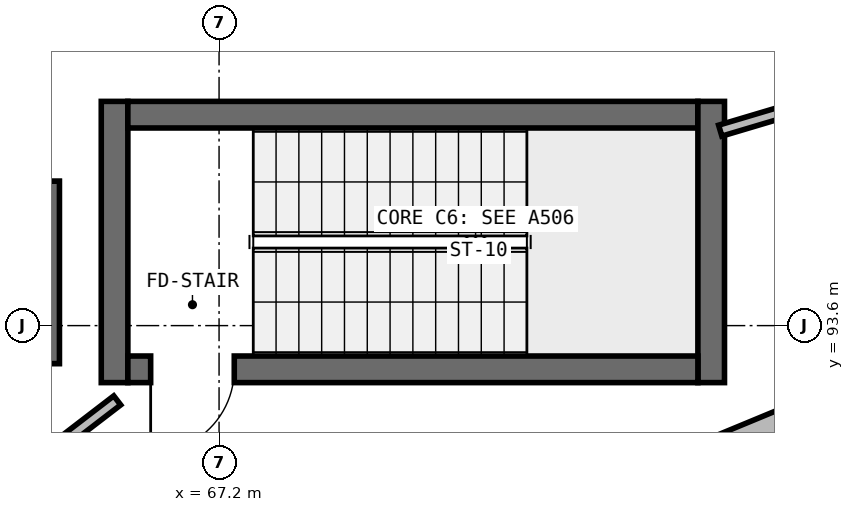
"""IFC4 building model, lengths in metres.
Left out: names, types, materials, properties, quantities, classifications, styles, units other than length and angle.
Written with IfcOpenShell. Run it as: python <this file> out.ifc"""

import sys

from ifc_helpers import new_model, si_unit, direction, frame, frame_2d, origin, place, context, subcontext, project, spatial, rectangle, extrude, element, fill, save


model = new_model("IFC4")
c1 = context("Model", 3, precision=1e-05, world=origin(), true_north=direction((0.0, 1.0)))
c2 = subcontext(c1, "Body", "Model", "MODEL_VIEW")
j1 = project(units=[si_unit("LENGTHUNIT", "METRE"), si_unit("PLANEANGLEUNIT", "RADIAN")], contexts=[c1])
p1 = place(None, origin())
s1 = spatial("IfcSite", under=j1, at=p1, CompositionType="ELEMENT")
p2 = place(p1, origin())
s2 = spatial("IfcBuilding", under=s1, at=p2, CompositionType="ELEMENT")
p3 = place(p2, frame((0.0, 0.0, 18.9)))
s3 = spatial("IfcBuildingStorey", under=s2, at=p3, CompositionType="ELEMENT", Elevation=18.9)
p4 = place(p3, frame((65.825, 92.85, 0.0), z_axis=(0.0, 0.0, 1.0), x_axis=(0.0, 1.0, 0.0)))
e1 = element("IfcWall", 1, at=p4, inside=s3, PredefinedType="SHEAR", context=c2, shape_type="SweptSolid", body=[
    extrude(rectangle(XDim=3.7, YDim=0.35, at=frame_2d((1.85, 0.0))), origin(), (0.0, 0.0, 1.0), 4.55),
])
p5 = place(p3, frame((66.0, 96.375, 0.0), z_axis=(0.0, 0.0, 1.0), x_axis=(1.0, 0.0, 0.0)))
e2 = element("IfcWall", 2, at=p5, inside=s3, PredefinedType="SHEAR", context=c2, shape_type="SweptSolid", body=[
    extrude(rectangle(XDim=7.5, YDim=0.35, at=frame_2d((3.75, 0.0))), origin(), (0.0, 0.0, 1.0), 4.55),
])
p6 = place(p3, frame((73.675, 96.55, 0.0), z_axis=(0.0, 0.0, 1.0), x_axis=(0.0, -1.0, 0.0)))
e3 = element("IfcWall", 3, at=p6, inside=s3, PredefinedType="SHEAR", context=c2, shape_type="SweptSolid", body=[
    extrude(rectangle(XDim=3.7, YDim=0.35, at=frame_2d((1.85, 0.0))), origin(), (0.0, 0.0, 1.0), 4.55),
])
p7 = place(p3, frame((73.5, 93.025, 0.0), z_axis=(0.0, 0.0, 1.0), x_axis=(-1.0, 0.0, 0.0)))
e4 = element("IfcWall", 4, at=p7, inside=s3, PredefinedType="SHEAR", context=c2, shape_type="SweptSolid", body=[
    extrude(rectangle(XDim=7.5, YDim=0.35, at=frame_2d((3.75, 0.0))), origin(), (0.0, 0.0, 1.0), 4.55),
])
p8 = place(p7, frame((6.1, 0.0, 0.0)))
e5 = element("IfcOpeningElement", 5, at=p8, cuts=e4, PredefinedType="OPENING", context=c2, shape_type="SweptSolid", body=[
    extrude(rectangle(XDim=1.1, YDim=2.15, at=frame_2d((0.55, 1.075))), frame((0.0, 0.185, 0.0), z_axis=(0.0, -1.0, 0.0), x_axis=(1.0, 0.0, 0.0)), (0.0, 0.0, 1.0), 0.37),
])
p9 = place(p3, frame((64.95, 95.5, 0.0), z_axis=(0.0, 0.0, 1.0), x_axis=(0.0, -1.0, 0.0)))
e6 = element("IfcWall", 6, at=p9, inside=s3, PredefinedType="SHEAR", context=c2, shape_type="SweptSolid", body=[
    extrude(rectangle(XDim=2.4, YDim=0.3, at=frame_2d((1.2, 0.0))), origin(), (0.0, 0.0, 1.0), 4.37),
])
p10 = place(p3, frame((76.988, 93.341, 0.0), z_axis=(0.0, 0.0, 1.0), x_axis=(-0.92385889973, -0.382733240508, 0.0)))
e7 = element("IfcWall", 7, at=p10, inside=s3, PredefinedType="SOLIDWALL", context=c2, shape_type="SweptSolid", body=[
    extrude(rectangle(XDim=10.081, YDim=0.29, at=frame_2d((5.04, 0.0))), origin(), (0.0, 0.0, 1.0), 4.31),
])
p11 = place(p10, frame((4.02, 0.0, 0.95)))
e8 = element("IfcOpeningElement", 8, at=p11, cuts=e7, PredefinedType="OPENING", context=c2, shape_type="SweptSolid", body=[
    extrude(rectangle(XDim=2.04, YDim=1.51, at=frame_2d((1.02, 0.755))), frame((0.0, 0.155, 0.0), z_axis=(0.0, -1.0, 0.0), x_axis=(1.0, 0.0, 0.0)), (0.0, 0.0, 1.0), 0.31),
])
p12 = place(p3, frame((76.057, 96.839, 0.0), z_axis=(0.0, 0.0, 1.0), x_axis=(-0.95838508169, -0.285478607244, 0.0)))
e9 = element("IfcWall", 9, at=p12, inside=s3, PredefinedType="PARTITIONING", context=c2, shape_type="SweptSolid", body=[
    extrude(rectangle(XDim=2.361, YDim=0.15, at=frame_2d((1.181, 0.0))), origin(), (0.0, 0.0, 1.0), 3.676),
])
p13 = place(p3, frame((65.86, 92.616, 0.0), z_axis=(0.0, 0.0, 1.0), x_axis=(-0.793301872689, -0.608828497024, 0.0)))
e10 = element("IfcWall", 10, at=p13, inside=s3, PredefinedType="PARTITIONING", context=c2, shape_type="SweptSolid", body=[
    extrude(rectangle(XDim=11.038, YDim=0.15, at=frame_2d((5.519, 0.0))), origin(), (0.0, 0.0, 1.0), 3.676),
])
p14 = place(p13, frame((4.95, 0.0, 0.0)))
e11 = element("IfcOpeningElement", 11, at=p14, cuts=e10, PredefinedType="OPENING", context=c2, shape_type="SweptSolid", body=[
    extrude(rectangle(XDim=1.1, YDim=2.2, at=frame_2d((0.55, 1.1))), frame((0.0, 0.085, 0.0), z_axis=(0.0, -1.0, 0.0), x_axis=(1.0, 0.0, 0.0)), (0.0, 0.0, 1.0), 0.17),
])
p15 = place(p3, frame((76.057, 96.839, 0.0), z_axis=(0.0, 0.0, 1.0), x_axis=(-0.258832719409, 0.965922162166, 0.0)))
e12 = element("IfcWall", 12, at=p15, inside=s3, PredefinedType="PARTITIONING", context=c2, shape_type="SweptSolid", body=[
    extrude(rectangle(XDim=6.44, YDim=0.15, at=frame_2d((3.22, 0.0))), origin(), (0.0, 0.0, 1.0), 3.676),
])
p16 = place(p8, origin())
e13 = element("IfcDoor", 13, at=p16, inside=s3, OperationType="SINGLE_SWING_RIGHT", PredefinedType="DOOR", context=c2, shape_type="SweptSolid", body=[
    extrude(rectangle(XDim=1.1, YDim=2.15, at=frame_2d((0.55, 1.075))), frame((0.0, 0.025, 0.0), z_axis=(0.0, -1.0, 0.0), x_axis=(1.0, 0.0, 0.0)), (0.0, 0.0, 1.0), 0.05),
])
fill(e5, e13)
save(model, sys.argv[1])
